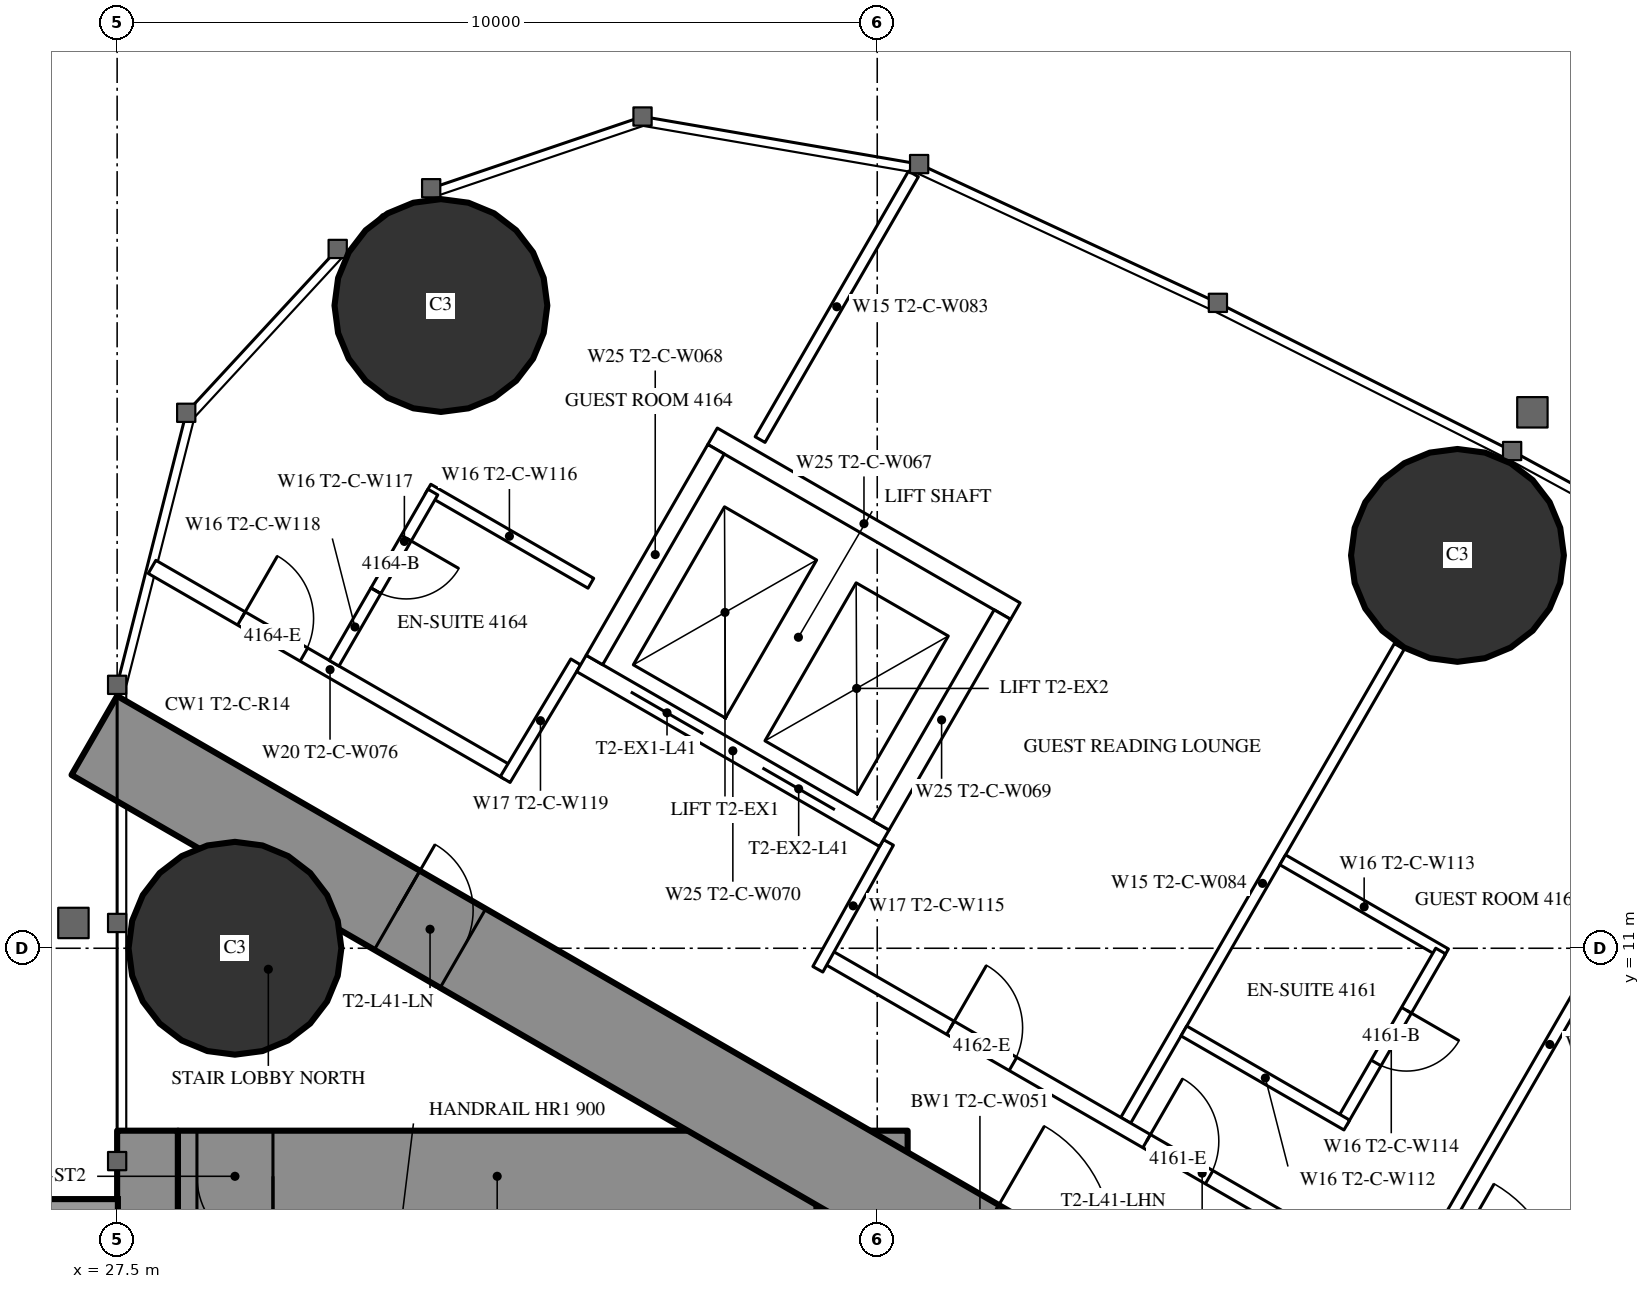
"""IFC4 building model, lengths in metres.
Left out: names, types, materials, properties, quantities, classifications, styles, units other than length and angle.
Written with IfcOpenShell. Run it as: python <this file> out.ifc"""

import sys

from ifc_helpers import new_model, si_unit, direction, frame, frame_2d, origin, origin_2d, place, context, subcontext, project, spatial, rectangle, circle, extrude, element, fill, save


model = new_model("IFC4")
c1 = context("Model", 3, precision=1e-05, world=origin(), true_north=direction((0.0, 1.0)))
c2 = subcontext(c1, "Body", "Model", "MODEL_VIEW")
j1 = project(units=[si_unit("LENGTHUNIT", "METRE"), si_unit("PLANEANGLEUNIT", "RADIAN")], contexts=[c1])
p1 = place(None, origin())
s1 = spatial("IfcSite", under=j1, at=p1, CompositionType="ELEMENT")
p2 = place(p1, origin())
s2 = spatial("IfcBuilding", under=s1, at=p2, CompositionType="ELEMENT")
p3 = place(p2, frame((0.0, 0.0, 156.3)))
s3 = spatial("IfcBuildingStorey", under=s2, at=p3, CompositionType="ELEMENT", Elevation=156.3)
for number, where, z_axis, x_axis in (
    (1, (31.76, 19.456, 0.0), (0.0, 0.0, 1.0), (1.0, 0.0, 0.0)),
    (2, (29.05, 11.0, 0.0), (0.0, 0.0, 1.0), (1.0, 0.0, 0.0)),
    (3, (45.134, 16.168, 0.0), (0.0, 0.0, 1.0), (1.0, 0.0, 0.0)),
):
    element("IfcColumn", number, at=place(p3, frame(where, z_axis=z_axis, x_axis=x_axis)), inside=s3, PredefinedType="COLUMN", context=c2, shape_type="SweptSolid", body=[
        extrude(circle(Radius=1.4, at=origin_2d()), origin(), (0.0, 0.0, 1.0), 3.5),
    ])
p4 = place(p3, frame((27.9, -8.6, 0.0), z_axis=(0.0, 0.0, 1.0), x_axis=(0.0, 1.0, 0.0)))
e4 = element("IfcWall", 4, at=p4, inside=s3, PredefinedType="SHEAR", context=c2, shape_type="SweptSolid", body=[
    extrude(rectangle(XDim=17.2, YDim=0.8, at=frame_2d((8.6, 0.0))), origin(), (0.0, 0.0, 1.0), 3.5),
])
p5 = place(p4, frame((2.45, 0.0, 0.6)))
e5 = element("IfcOpeningElement", 5, at=p5, cuts=e4, PredefinedType="OPENING", context=c2, shape_type="SweptSolid", body=[
    extrude(rectangle(XDim=0.6, YDim=2.1, at=frame_2d((0.3, 1.05))), frame((0.0, 0.41, 0.0), z_axis=(0.0, -1.0, 0.0), x_axis=(1.0, 0.0, 0.0)), (0.0, 0.0, 1.0), 0.82),
])
p6 = place(p4, frame((14.15, 0.0, 0.6)))
e6 = element("IfcOpeningElement", 6, at=p6, cuts=e4, PredefinedType="OPENING", context=c2, shape_type="SweptSolid", body=[
    extrude(rectangle(XDim=0.6, YDim=2.1, at=frame_2d((0.3, 1.05))), frame((0.0, 0.41, 0.0), z_axis=(0.0, -1.0, 0.0), x_axis=(1.0, 0.0, 0.0)), (0.0, 0.0, 1.0), 0.82),
])
p7 = place(p3, frame((37.3, -8.6, 0.0), z_axis=(0.0, 0.0, 1.0), x_axis=(0.0, 1.0, 0.0)))
e7 = element("IfcWall", 7, at=p7, inside=s3, PredefinedType="SHEAR", context=c2, shape_type="SweptSolid", body=[
    extrude(rectangle(XDim=17.2, YDim=1.2, at=frame_2d((8.6, 0.0))), origin(), (0.0, 0.0, 1.0), 3.5),
])
p8 = place(p7, frame((7.7, 0.0, 0.0)))
e8 = element("IfcOpeningElement", 8, at=p8, cuts=e7, PredefinedType="OPENING", context=c2, shape_type="SweptSolid", body=[
    extrude(rectangle(XDim=1.8, YDim=2.2, at=frame_2d((0.9, 1.1))), frame((0.0, 0.61, 0.0), z_axis=(0.0, -1.0, 0.0), x_axis=(1.0, 0.0, 0.0)), (0.0, 0.0, 1.0), 1.22),
])
p9 = place(p3, frame((28.3, 8.0, 0.0), z_axis=(0.0, 0.0, 1.0), x_axis=(1.0, 0.0, 0.0)))
e9 = element("IfcWall", 9, at=p9, inside=s3, PredefinedType="SHEAR", context=c2, shape_type="SweptSolid", body=[
    extrude(rectangle(XDim=8.4, YDim=1.2, at=frame_2d((4.2, 0.0))), origin(), (0.0, 0.0, 1.0), 3.5),
])
p10 = place(p9, frame((0.25, 0.0, 0.0)))
e10 = element("IfcOpeningElement", 10, at=p10, cuts=e9, PredefinedType="OPENING", context=c2, shape_type="SweptSolid", body=[
    extrude(rectangle(XDim=1.0, YDim=2.2, at=frame_2d((0.5, 1.1))), frame((0.0, 0.61, 0.0), z_axis=(0.0, -1.0, 0.0), x_axis=(1.0, 0.0, 0.0)), (0.0, 0.0, 1.0), 1.22),
])
p11 = place(p3, frame((27.2, 13.8, 0.0), z_axis=(0.0, 0.0, 1.0), x_axis=(0.866024515034, -0.500001539357, 0.0)))
e11 = element("IfcWall", 11, at=p11, inside=s3, PredefinedType="SHEAR", context=c2, shape_type="SweptSolid", body=[
    extrude(rectangle(XDim=26.907, YDim=1.2, at=frame_2d((13.454, 0.0))), origin(), (0.0, 0.0, 1.0), 3.5),
])
p12 = place(p11, frame((4.6, 0.0, 0.0)))
e12 = element("IfcOpeningElement", 12, at=p12, cuts=e11, PredefinedType="OPENING", context=c2, shape_type="SweptSolid", body=[
    extrude(rectangle(XDim=1.0, YDim=2.2, at=frame_2d((0.5, 1.1))), frame((0.0, 0.61, 0.0), z_axis=(0.0, -1.0, 0.0), x_axis=(1.0, 0.0, 0.0)), (0.0, 0.0, 1.0), 1.22),
])
p13 = place(p11, frame((13.395, 0.0, 0.0)))
e13 = element("IfcOpeningElement", 13, at=p13, cuts=e11, PredefinedType="OPENING", context=c2, shape_type="SweptSolid", body=[
    extrude(rectangle(XDim=1.8, YDim=2.2, at=frame_2d((0.9, 1.1))), frame((0.0, 0.61, 0.0), z_axis=(0.0, -1.0, 0.0), x_axis=(1.0, 0.0, 0.0)), (0.0, 0.0, 1.0), 1.22),
])
p14 = place(p3, frame((40.769, 8.737, 0.0), z_axis=(0.0, 0.0, 1.0), x_axis=(0.500013115284, 0.866017831539, 0.0)))
e14 = element("IfcWall", 14, at=p14, inside=s3, PredefinedType="PARTITIONING", context=c2, shape_type="SweptSolid", body=[
    extrude(rectangle(XDim=7.198, YDim=0.15, at=frame_2d((3.599, 0.0))), origin(), (0.0, 0.0, 1.0), 2.3),
])
p15 = place(p3, frame((44.521, 6.571, 0.0), z_axis=(0.0, 0.0, 1.0), x_axis=(0.500020376429, 0.866013639128, 0.0)))
e15 = element("IfcWall", 15, at=p15, inside=s3, PredefinedType="PARTITIONING", context=c2, shape_type="SweptSolid", body=[
    extrude(rectangle(XDim=7.306, YDim=0.15, at=frame_2d((3.653, 0.0))), origin(), (0.0, 0.0, 1.0), 2.3),
])
p16 = place(p3, frame((35.959, 17.692, 0.0), z_axis=(0.0, 0.0, 1.0), x_axis=(0.499991298838, 0.866030427344, 0.0)))
e16 = element("IfcWall", 16, at=p16, inside=s3, PredefinedType="PARTITIONING", context=c2, shape_type="SweptSolid", body=[
    extrude(rectangle(XDim=4.035, YDim=0.15, at=frame_2d((2.018, 0.0))), origin(), (0.0, 0.0, 1.0), 3.25),
])
p17 = place(p3, frame((27.959, 16.017, 0.0), z_axis=(0.0, 0.0, 1.0), x_axis=(0.866028444157, -0.499994733882, 0.0)))
e17 = element("IfcWall", 17, at=p17, inside=s3, PredefinedType="PARTITIONING", context=c2, shape_type="SweptSolid", body=[
    extrude(rectangle(XDim=5.407, YDim=0.2, at=frame_2d((2.704, 0.0))), origin(), (0.0, 0.0, 1.0), 3.25),
])
p18 = place(p17, frame((1.357, 0.0, 0.0)))
e18 = element("IfcOpeningElement", 18, at=p18, cuts=e17, PredefinedType="OPENING", context=c2, shape_type="SweptSolid", body=[
    extrude(rectangle(XDim=0.95, YDim=2.2, at=frame_2d((0.475, 1.1))), frame((0.0, 0.11, 0.0), z_axis=(0.0, -1.0, 0.0), x_axis=(1.0, 0.0, 0.0)), (0.0, 0.0, 1.0), 0.22),
])
p19 = place(p3, frame((36.834, 10.894, 0.0), z_axis=(0.0, 0.0, 1.0), x_axis=(0.866031655879, -0.499989170898, 0.0)))
e19 = element("IfcWall", 19, at=p19, inside=s3, PredefinedType="PARTITIONING", context=c2, shape_type="SweptSolid", body=[
    extrude(rectangle(XDim=11.41, YDim=0.2, at=frame_2d((5.705, 0.0))), origin(), (0.0, 0.0, 1.0), 3.25),
])
p20 = place(p19, frame((4.861, 0.0, 0.0)))
e20 = element("IfcOpeningElement", 20, at=p20, cuts=e19, PredefinedType="OPENING", context=c2, shape_type="SweptSolid", body=[
    extrude(rectangle(XDim=0.95, YDim=2.2, at=frame_2d((0.475, 1.1))), frame((0.0, 0.11, 0.0), z_axis=(0.0, -1.0, 0.0), x_axis=(1.0, 0.0, 0.0)), (0.0, 0.0, 1.0), 0.22),
])
p21 = place(p19, frame((1.881, 0.0, 0.0)))
e21 = element("IfcOpeningElement", 21, at=p21, cuts=e19, PredefinedType="OPENING", context=c2, shape_type="SweptSolid", body=[
    extrude(rectangle(XDim=0.95, YDim=2.2, at=frame_2d((0.475, 1.1))), frame((0.0, 0.11, 0.0), z_axis=(0.0, -1.0, 0.0), x_axis=(1.0, 0.0, 0.0)), (0.0, 0.0, 1.0), 0.22),
])
p22 = place(p19, frame((9.102, 0.0, 0.0)))
e22 = element("IfcOpeningElement", 22, at=p22, cuts=e19, PredefinedType="OPENING", context=c2, shape_type="SweptSolid", body=[
    extrude(rectangle(XDim=1.8, YDim=2.2, at=frame_2d((0.9, 1.1))), frame((0.0, 0.11, 0.0), z_axis=(0.0, -1.0, 0.0), x_axis=(1.0, 0.0, 0.0)), (0.0, 0.0, 1.0), 0.22),
])
p23 = place(p3, frame((36.719, 10.723, 0.0), z_axis=(0.0, 0.0, 1.0), x_axis=(0.486348184724, 0.87376509613, 0.0)))
e23 = element("IfcWall", 23, at=p23, inside=s3, PredefinedType="PARTITIONING", context=c2, shape_type="SweptSolid", body=[
    extrude(rectangle(XDim=1.91, YDim=0.15, at=frame_2d((0.955, 0.0))), origin(), (0.0, 0.0, 1.0), 3.25),
])
p24 = place(p3, frame((33.533, 14.767, 0.0), z_axis=(0.0, 0.0, 1.0), x_axis=(-0.514296815006, -0.857612258585, 0.0)))
e24 = element("IfcWall", 24, at=p24, inside=s3, PredefinedType="PARTITIONING", context=c2, shape_type="SweptSolid", body=[
    extrude(rectangle(XDim=1.805, YDim=0.15, at=frame_2d((0.902, 0.0))), origin(), (0.0, 0.0, 1.0), 3.25),
])
p25 = place(p3, frame((42.834, 12.164, 0.0), z_axis=(0.0, 0.0, 1.0), x_axis=(0.866031185235, -0.4999899861, 0.0)))
e25 = element("IfcWall", 25, at=p25, inside=s3, PredefinedType="PARTITIONING", context=c2, shape_type="SweptSolid", body=[
    extrude(rectangle(XDim=2.475, YDim=0.15, at=frame_2d((1.238, 0.0))), origin(), (0.0, 0.0, 1.0), 3.25),
])
p26 = place(p3, frame((43.613, 8.712, 0.0), z_axis=(0.0, 0.0, 1.0), x_axis=(0.500006934395, 0.866021400173, 0.0)))
e26 = element("IfcWall", 26, at=p26, inside=s3, PredefinedType="PARTITIONING", context=c2, shape_type="SweptSolid", body=[
    extrude(rectangle(XDim=2.6, YDim=0.15, at=frame_2d((1.3, 0.0))), origin(), (0.0, 0.0, 1.0), 3.25),
])
p27 = place(p26, frame((0.9, 0.0, 0.0)))
e27 = element("IfcOpeningElement", 27, at=p27, cuts=e26, PredefinedType="OPENING", context=c2, shape_type="SweptSolid", body=[
    extrude(rectangle(XDim=0.8, YDim=2.2, at=frame_2d((0.4, 1.1))), frame((0.0, 0.085, 0.0), z_axis=(0.0, -1.0, 0.0), x_axis=(1.0, 0.0, 0.0)), (0.0, 0.0, 1.0), 0.17),
])
p28 = place(p3, frame((41.534, 9.912, 0.0), z_axis=(0.0, 0.0, 1.0), x_axis=(0.866031185235, -0.4999899861, 0.0)))
e28 = element("IfcWall", 28, at=p28, inside=s3, PredefinedType="PARTITIONING", context=c2, shape_type="SweptSolid", body=[
    extrude(rectangle(XDim=2.475, YDim=0.15, at=frame_2d((1.238, 0.0))), origin(), (0.0, 0.0, 1.0), 2.45),
])
p29 = place(p3, frame((31.589, 17.04, 0.0), z_axis=(0.0, 0.0, 1.0), x_axis=(0.866006523861, -0.500032699561, 0.0)))
e29 = element("IfcWall", 29, at=p29, inside=s3, PredefinedType="PARTITIONING", context=c2, shape_type="SweptSolid", body=[
    extrude(rectangle(XDim=2.475, YDim=0.15, at=frame_2d((1.237, 0.0))), origin(), (0.0, 0.0, 1.0), 3.25),
])
p30 = place(p3, frame((30.904, 15.703, 0.0), z_axis=(0.0, 0.0, 1.0), x_axis=(0.499990139034, 0.866031096941, 0.0)))
e30 = element("IfcWall", 30, at=p30, inside=s3, PredefinedType="PARTITIONING", context=c2, shape_type="SweptSolid", body=[
    extrude(rectangle(XDim=1.5, YDim=0.15, at=frame_2d((0.75, 0.0))), origin(), (0.0, 0.0, 1.0), 3.25),
])
p31 = place(p30, origin())
e31 = element("IfcOpeningElement", 31, at=p31, cuts=e30, PredefinedType="OPENING", context=c2, shape_type="SweptSolid", body=[
    extrude(rectangle(XDim=0.8, YDim=2.2, at=frame_2d((0.4, 1.1))), frame((0.0, 0.085, 0.0), z_axis=(0.0, -1.0, 0.0), x_axis=(1.0, 0.0, 0.0)), (0.0, 0.0, 1.0), 0.17),
])
p32 = place(p3, frame((33.608, 14.747, 0.0), z_axis=(0.0, 0.0, 1.0), x_axis=(0.866043305498, -0.49996899204, 0.0)))
e32 = element("IfcWall", 32, at=p32, inside=s3, PredefinedType="PARTITIONING", context=c2, shape_type="SweptSolid", body=[
    extrude(rectangle(XDim=4.6, YDim=0.25, at=frame_2d((2.3, 0.0))), origin(), (0.0, 0.0, 1.0), 3.25),
])
p33 = place(p32, frame((0.75, 0.0, 0.0)))
e33 = element("IfcOpeningElement", 33, at=p33, cuts=e32, PredefinedType="OPENING", context=c2, shape_type="SweptSolid", body=[
    extrude(rectangle(XDim=1.1, YDim=2.2, at=frame_2d((0.55, 1.1))), frame((0.0, 0.135, 0.0), z_axis=(0.0, -1.0, 0.0), x_axis=(1.0, 0.0, 0.0)), (0.0, 0.0, 1.0), 0.27),
])
p34 = place(p32, frame((2.75, 0.0, 0.0)))
e34 = element("IfcOpeningElement", 34, at=p34, cuts=e32, PredefinedType="OPENING", context=c2, shape_type="SweptSolid", body=[
    extrude(rectangle(XDim=1.1, YDim=2.2, at=frame_2d((0.55, 1.1))), frame((0.0, 0.135, 0.0), z_axis=(0.0, -1.0, 0.0), x_axis=(1.0, 0.0, 0.0)), (0.0, 0.0, 1.0), 0.27),
])
p35 = place(p3, frame((35.333, 17.736, 0.0), z_axis=(0.0, 0.0, 1.0), x_axis=(0.866043305498, -0.49996899204, 0.0)))
e35 = element("IfcWall", 35, at=p35, inside=s3, PredefinedType="PARTITIONING", context=c2, shape_type="SweptSolid", body=[
    extrude(rectangle(XDim=4.6, YDim=0.25, at=frame_2d((2.3, 0.0))), origin(), (0.0, 0.0, 1.0), 3.25),
])
for number, where, z_axis, x_axis in (
    (36, (33.779, 14.793, 0.0), (0.0, 0.0, 1.0), (0.5, 0.866, 0.0)),
    (37, (37.547, 12.618, 0.0), (0.0, 0.0, 1.0), (0.5, 0.866, 0.0)),
):
    element("IfcWall", number, at=place(p3, frame(where, z_axis=z_axis, x_axis=x_axis)), inside=s3, PredefinedType="PARTITIONING", context=c2, shape_type="SweptSolid", body=[
        extrude(rectangle(XDim=3.201, YDim=0.25, at=frame_2d((1.6, 0.0))), origin(), (0.0, 0.0, 1.0), 3.25),
    ])
p36 = place(p3, frame((30.354, 14.75, 0.0), z_axis=(0.0, 0.0, 1.0), x_axis=(0.50002983664, 0.866008176907, 0.0)))
e38 = element("IfcWall", 38, at=p36, inside=s3, PredefinedType="PARTITIONING", context=c2, shape_type="SweptSolid", body=[
    extrude(rectangle(XDim=1.1, YDim=0.15, at=frame_2d((0.55, 0.0))), origin(), (0.0, 0.0, 1.0), 1.95),
])
p37 = place(p27, origin())
e39 = element("IfcDoor", 39, at=p37, inside=s3, OperationType="SINGLE_SWING_RIGHT", PredefinedType="DOOR", context=c2, shape_type="SweptSolid", body=[
    extrude(rectangle(XDim=0.8, YDim=2.2, at=frame_2d((0.4, 1.1))), frame((0.0, 0.025, 0.0), z_axis=(0.0, -1.0, 0.0), x_axis=(1.0, 0.0, 0.0)), (0.0, 0.0, 1.0), 0.05),
])
fill(e27, e39)
p38 = place(p20, origin())
e40 = element("IfcDoor", 40, at=p38, inside=s3, OperationType="SINGLE_SWING_LEFT", PredefinedType="DOOR", context=c2, shape_type="SweptSolid", body=[
    extrude(rectangle(XDim=0.95, YDim=2.2, at=frame_2d((0.475, 1.1))), frame((0.0, 0.025, 0.0), z_axis=(0.0, -1.0, 0.0), x_axis=(1.0, 0.0, 0.0)), (0.0, 0.0, 1.0), 0.05),
])
fill(e20, e40)
p39 = place(p21, origin())
e41 = element("IfcDoor", 41, at=p39, inside=s3, OperationType="SINGLE_SWING_LEFT", PredefinedType="DOOR", context=c2, shape_type="SweptSolid", body=[
    extrude(rectangle(XDim=0.95, YDim=2.2, at=frame_2d((0.475, 1.1))), frame((0.0, 0.025, 0.0), z_axis=(0.0, -1.0, 0.0), x_axis=(1.0, 0.0, 0.0)), (0.0, 0.0, 1.0), 0.05),
])
fill(e21, e41)
p40 = place(p31, origin())
e42 = element("IfcDoor", 42, at=p40, inside=s3, OperationType="SINGLE_SWING_RIGHT", PredefinedType="DOOR", context=c2, shape_type="SweptSolid", body=[
    extrude(rectangle(XDim=0.8, YDim=2.2, at=frame_2d((0.4, 1.1))), frame((0.0, 0.025, 0.0), z_axis=(0.0, -1.0, 0.0), x_axis=(1.0, 0.0, 0.0)), (0.0, 0.0, 1.0), 0.05),
])
fill(e31, e42)
p41 = place(p18, origin())
e43 = element("IfcDoor", 43, at=p41, inside=s3, OperationType="SINGLE_SWING_LEFT", PredefinedType="DOOR", context=c2, shape_type="SweptSolid", body=[
    extrude(rectangle(XDim=0.95, YDim=2.2, at=frame_2d((0.475, 1.1))), frame((0.0, 0.025, 0.0), z_axis=(0.0, -1.0, 0.0), x_axis=(1.0, 0.0, 0.0)), (0.0, 0.0, 1.0), 0.05),
])
fill(e18, e43)
p42 = place(p12, origin())
e44 = element("IfcDoor", 44, at=p42, inside=s3, OperationType="SINGLE_SWING_LEFT", PredefinedType="DOOR", context=c2, shape_type="SweptSolid", body=[
    extrude(rectangle(XDim=1.0, YDim=2.2, at=frame_2d((0.5, 1.1))), frame((0.0, 0.025, 0.0), z_axis=(0.0, -1.0, 0.0), x_axis=(1.0, 0.0, 0.0)), (0.0, 0.0, 1.0), 0.05),
])
fill(e12, e44)
p43 = place(p10, origin())
e45 = element("IfcDoor", 45, at=p43, inside=s3, OperationType="SINGLE_SWING_RIGHT", PredefinedType="DOOR", context=c2, shape_type="SweptSolid", body=[
    extrude(rectangle(XDim=1.0, YDim=2.2, at=frame_2d((0.5, 1.1))), frame((0.0, 0.025, 0.0), z_axis=(0.0, -1.0, 0.0), x_axis=(1.0, 0.0, 0.0)), (0.0, 0.0, 1.0), 0.05),
])
fill(e10, e45)
p44 = place(p33, origin())
e46 = element("IfcDoor", 46, at=p44, inside=s3, OperationType="DOUBLE_DOOR_SLIDING", PredefinedType="USERDEFINED", context=c2, shape_type="SweptSolid", body=[
    extrude(rectangle(XDim=1.1, YDim=2.2, at=frame_2d((0.55, 1.1))), frame((0.0, 0.025, 0.0), z_axis=(0.0, -1.0, 0.0), x_axis=(1.0, 0.0, 0.0)), (0.0, 0.0, 1.0), 0.05),
])
fill(e33, e46)
p45 = place(p34, origin())
e47 = element("IfcDoor", 47, at=p45, inside=s3, OperationType="DOUBLE_DOOR_SLIDING", PredefinedType="USERDEFINED", context=c2, shape_type="SweptSolid", body=[
    extrude(rectangle(XDim=1.1, YDim=2.2, at=frame_2d((0.55, 1.1))), frame((0.0, 0.025, 0.0), z_axis=(0.0, -1.0, 0.0), x_axis=(1.0, 0.0, 0.0)), (0.0, 0.0, 1.0), 0.05),
])
fill(e34, e47)
save(model, sys.argv[1])
